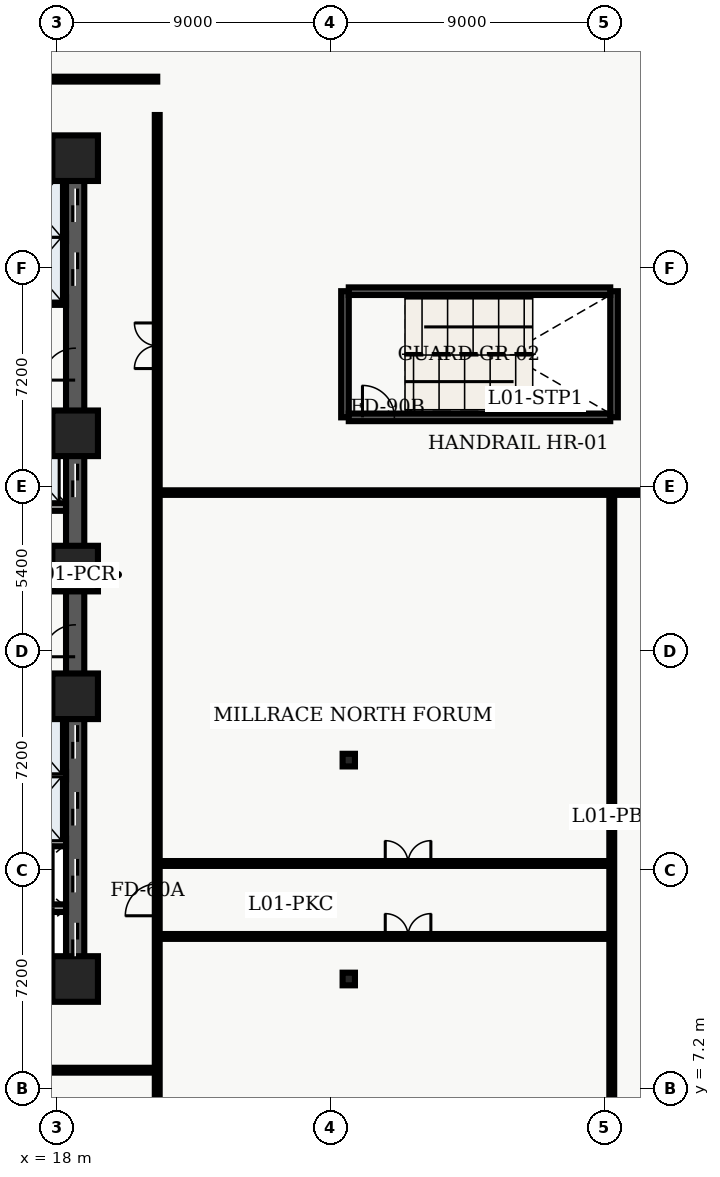
"""IFC4 building model, lengths in metres.
Left out: names, types, materials, properties, quantities, classifications, styles, units other than length and angle.
Written with IfcOpenShell. Run it as: python <this file> out.ifc"""

import sys

from ifc_helpers import new_model, entity, si_unit, converted_unit, direction, frame, origin_with_axes, origin_2d_with_axis, place, context, subcontext, project, spatial, polyline, rectangle, i_section, outline, extrude, element, fill, save


model = new_model("IFC4")
c1 = context("Model", 3, precision=1e-05, world=origin_with_axes(), true_north=direction((0.0, 1.0)))
c2 = subcontext(c1, "Body", "Model", "MODEL_VIEW")
j1 = project(units=[si_unit("LENGTHUNIT", "METRE"), converted_unit("PLANEANGLEUNIT", "DEGREE", entity("IfcPlaneAngleMeasure", 0.017), si_unit("PLANEANGLEUNIT", "RADIAN"), dimensions=[0, 0, 0, 0, 0, 0, 0])], contexts=[c1])
p1 = place(None, origin_with_axes())
s1 = spatial("IfcSite", under=j1, at=p1, CompositionType="ELEMENT")
p2 = place(p1, origin_with_axes())
s2 = spatial("IfcBuilding", under=s1, at=p2, CompositionType="ELEMENT")
p3 = place(p2, frame((0.0, 0.0, 5.7), z_axis=(0.0, 0.0, 1.0), x_axis=(1.0, 0.0, 0.0)))
s3 = spatial("IfcBuildingStorey", under=s2, at=p3, CompositionType="ELEMENT", Elevation=5.7)
p4 = place(p3, frame((11.4, 10.8, 0.0), z_axis=(0.0, 0.0, 1.0), x_axis=(1.0, 0.0, 0.0)))
e1 = element("IfcWall", 1, at=p4, inside=s3, PredefinedType="SHEAR", context=c2, shape_type="SweptSolid", body=[
    extrude(outline(polyline([(0.0, -0.3), (7.2, -0.3), (7.2, 0.3), (0.0, 0.3), (0.0, -0.3)])), origin_with_axes(), (0.0, 0.0, 1.0), 4.86),
])
p5 = place(p4, frame((2.625, 0.0, 0.0), z_axis=(0.0, 0.0, 1.0), x_axis=(1.0, 0.0, 0.0)))
e2 = element("IfcOpeningElement", 2, at=p5, cuts=e1, PredefinedType="OPENING", context=c2, shape_type="SweptSolid", body=[
    extrude(rectangle(XDim=1.05, YDim=0.62, at=origin_2d_with_axis()), origin_with_axes(), (0.0, 0.0, 1.0), 2.15),
])
p6 = place(p3, frame((11.4, 37.8, 0.0), z_axis=(0.0, 0.0, 1.0), x_axis=(1.0, 0.0, 0.0)))
e3 = element("IfcWall", 3, at=p6, inside=s3, PredefinedType="SHEAR", context=c2, shape_type="SweptSolid", body=[
    extrude(outline(polyline([(0.0, -0.3), (7.2, -0.3), (7.2, 0.3), (0.0, 0.3), (0.0, -0.3)])), origin_with_axes(), (0.0, 0.0, 1.0), 4.86),
])
p7 = place(p6, frame((2.625, 0.0, 0.0), z_axis=(0.0, 0.0, 1.0), x_axis=(1.0, 0.0, 0.0)))
e4 = element("IfcOpeningElement", 4, at=p7, cuts=e3, PredefinedType="OPENING", context=c2, shape_type="SweptSolid", body=[
    extrude(rectangle(XDim=1.05, YDim=0.62, at=origin_2d_with_axis()), origin_with_axes(), (0.0, 0.0, 1.0), 2.15),
])
p8 = place(p3, frame((18.6, 10.8, 0.0), z_axis=(0.0, 0.0, 1.0), x_axis=(0.0, 1.0, 0.0)))
e5 = element("IfcWall", 5, at=p8, inside=s3, PredefinedType="SHEAR", context=c2, shape_type="SweptSolid", body=[
    extrude(outline(polyline([(0.0, -0.3), (13.5, -0.3), (13.5, 0.3), (0.0, 0.3), (0.0, -0.3)])), origin_with_axes(), (0.0, 0.0, 1.0), 4.86),
])
p9 = place(p8, frame((1.3, 0.0, 0.0), z_axis=(0.0, 0.0, 1.0), x_axis=(1.0, 0.0, 0.0)))
e6 = element("IfcOpeningElement", 6, at=p9, cuts=e5, PredefinedType="OPENING", context=c2, shape_type="SweptSolid", body=[
    extrude(rectangle(XDim=1.1, YDim=0.62, at=origin_2d_with_axis()), origin_with_axes(), (0.0, 0.0, 1.0), 2.15),
])
p10 = place(p8, frame((3.4, 0.0, 0.0), z_axis=(0.0, 0.0, 1.0), x_axis=(1.0, 0.0, 0.0)))
e7 = element("IfcOpeningElement", 7, at=p10, cuts=e5, PredefinedType="OPENING", context=c2, shape_type="SweptSolid", body=[
    extrude(rectangle(XDim=1.1, YDim=0.62, at=origin_2d_with_axis()), origin_with_axes(), (0.0, 0.0, 1.0), 2.15),
])
p11 = place(p8, frame((5.6, 0.0, 0.0), z_axis=(0.0, 0.0, 1.0), x_axis=(1.0, 0.0, 0.0)))
e8 = element("IfcOpeningElement", 8, at=p11, cuts=e5, PredefinedType="OPENING", context=c2, shape_type="SweptSolid", body=[
    extrude(rectangle(XDim=1.1, YDim=0.62, at=origin_2d_with_axis()), origin_with_axes(), (0.0, 0.0, 1.0), 2.15),
])
p12 = place(p8, frame((7.8, 0.0, 0.0), z_axis=(0.0, 0.0, 1.0), x_axis=(1.0, 0.0, 0.0)))
e9 = element("IfcOpeningElement", 9, at=p12, cuts=e5, PredefinedType="OPENING", context=c2, shape_type="SweptSolid", body=[
    extrude(rectangle(XDim=1.1, YDim=0.62, at=origin_2d_with_axis()), origin_with_axes(), (0.0, 0.0, 1.0), 2.15),
])
p13 = place(p8, frame((11.125, 0.0, 0.0), z_axis=(0.0, 0.0, 1.0), x_axis=(1.0, 0.0, 0.0)))
e10 = element("IfcOpeningElement", 10, at=p13, cuts=e5, PredefinedType="OPENING", context=c2, shape_type="SweptSolid", body=[
    extrude(rectangle(XDim=1.05, YDim=0.62, at=origin_2d_with_axis()), origin_with_axes(), (0.0, 0.0, 1.0), 2.15),
])
p14 = place(p3, frame((18.6, 24.3, 0.0), z_axis=(0.0, 0.0, 1.0), x_axis=(0.0, 1.0, 0.0)))
e11 = element("IfcWall", 11, at=p14, inside=s3, PredefinedType="SHEAR", context=c2, shape_type="SweptSolid", body=[
    extrude(outline(polyline([(0.0, -0.3), (13.5, -0.3), (13.5, 0.3), (0.0, 0.3), (0.0, -0.3)])), origin_with_axes(), (0.0, 0.0, 1.0), 4.86),
])
p15 = place(p14, frame((9.85, 0.0, 0.0), z_axis=(0.0, 0.0, 1.0), x_axis=(1.0, 0.0, 0.0)))
e12 = element("IfcOpeningElement", 12, at=p15, cuts=e11, PredefinedType="OPENING", context=c2, shape_type="SweptSolid", body=[
    extrude(rectangle(XDim=1.1, YDim=0.62, at=origin_2d_with_axis()), origin_with_axes(), (0.0, 0.0, 1.0), 2.15),
])
p16 = place(p14, frame((11.95, 0.0, 0.0), z_axis=(0.0, 0.0, 1.0), x_axis=(1.0, 0.0, 0.0)))
e13 = element("IfcOpeningElement", 13, at=p16, cuts=e11, PredefinedType="OPENING", context=c2, shape_type="SweptSolid", body=[
    extrude(rectangle(XDim=1.1, YDim=0.62, at=origin_2d_with_axis()), origin_with_axes(), (0.0, 0.0, 1.0), 2.15),
])
p17 = place(p14, frame((2.9, 0.0, 0.0), z_axis=(0.0, 0.0, 1.0), x_axis=(1.0, 0.0, 0.0)))
e14 = element("IfcOpeningElement", 14, at=p17, cuts=e11, PredefinedType="OPENING", context=c2, shape_type="SweptSolid", body=[
    extrude(rectangle(XDim=1.1, YDim=0.62, at=origin_2d_with_axis()), origin_with_axes(), (0.0, 0.0, 1.0), 2.15),
])
p18 = place(p14, frame((6.725, 0.0, 0.0), z_axis=(0.0, 0.0, 1.0), x_axis=(1.0, 0.0, 0.0)))
e15 = element("IfcOpeningElement", 15, at=p18, cuts=e11, PredefinedType="OPENING", context=c2, shape_type="SweptSolid", body=[
    extrude(rectangle(XDim=1.05, YDim=0.62, at=origin_2d_with_axis()), origin_with_axes(), (0.0, 0.0, 1.0), 2.15),
])
for number, where, z_axis, x_axis in (
    (16, (11.7, 19.825, 0.0), (0.0, 0.0, 1.0), (1.0, 0.0, 0.0)),
    (17, (11.7, 28.775, 0.0), (0.0, 0.0, 1.0), (1.0, 0.0, 0.0)),
):
    element("IfcWall", number, at=place(p3, frame(where, z_axis=z_axis, x_axis=x_axis)), inside=s3, PredefinedType="SHEAR", context=c2, shape_type="SweptSolid", body=[
        extrude(outline(polyline([(0.0, -0.125), (6.6, -0.125), (6.6, 0.125), (0.0, 0.125), (0.0, -0.125)])), origin_with_axes(), (0.0, 0.0, 1.0), 4.86),
    ])
p19 = place(p3, frame((11.7, 24.1, 0.0), z_axis=(0.0, 0.0, 1.0), x_axis=(1.0, 0.0, 0.0)))
e18 = element("IfcWall", 18, at=p19, inside=s3, PredefinedType="SOLIDWALL", context=c2, shape_type="SweptSolid", body=[
    extrude(outline(polyline([(0.0, -0.125), (6.6, -0.125), (6.6, 0.125), (0.0, 0.125), (0.0, -0.125)])), origin_with_axes(), (0.0, 0.0, 1.0), 3.6),
])
p20 = place(p19, frame((3.75, 0.0, 0.0), z_axis=(0.0, 0.0, 1.0), x_axis=(1.0, 0.0, 0.0)))
e19 = element("IfcOpeningElement", 19, at=p20, cuts=e18, PredefinedType="OPENING", context=c2, shape_type="SweptSolid", body=[
    extrude(rectangle(XDim=0.9, YDim=0.27, at=origin_2d_with_axis()), origin_with_axes(), (0.0, 0.0, 1.0), 2.15),
])
p21 = place(p3, frame((11.7, 26.325, 0.0), z_axis=(0.0, 0.0, 1.0), x_axis=(1.0, 0.0, 0.0)))
e20 = element("IfcWall", 20, at=p21, inside=s3, PredefinedType="SOLIDWALL", context=c2, shape_type="SweptSolid", body=[
    extrude(outline(polyline([(0.0, -0.125), (6.6, -0.125), (6.6, 0.125), (0.0, 0.125), (0.0, -0.125)])), origin_with_axes(), (0.0, 0.0, 1.0), 3.6),
])
p22 = place(p21, frame((3.5, 0.0, 0.0), z_axis=(0.0, 0.0, 1.0), x_axis=(1.0, 0.0, 0.0)))
e21 = element("IfcOpeningElement", 21, at=p22, cuts=e20, PredefinedType="OPENING", context=c2, shape_type="SweptSolid", body=[
    extrude(rectangle(XDim=0.9, YDim=0.27, at=origin_2d_with_axis()), origin_with_axes(), (0.0, 0.0, 1.0), 2.15),
])
for number, where, z_axis, x_axis in (
    (22, (27.475, 29.275, 0.0), (0.0, 0.0, 1.0), (0.0, 1.0, 0.0)),
    (23, (36.325, 29.275, 0.0), (0.0, 0.0, 1.0), (0.0, 1.0, 0.0)),
):
    element("IfcWall", number, at=place(p3, frame(where, z_axis=z_axis, x_axis=x_axis)), inside=s3, PredefinedType="SHEAR", context=c2, shape_type="SweptSolid", body=[
        extrude(outline(polyline([(0.0, -0.125), (4.15, -0.125), (4.15, 0.125), (0.0, 0.125), (0.0, -0.125)])), origin_with_axes(), (0.0, 0.0, 1.0), 4.86),
    ])
p23 = place(p3, frame((27.6, 29.275, 0.0), z_axis=(0.0, 0.0, 1.0), x_axis=(1.0, 0.0, 0.0)))
e24 = element("IfcWall", 24, at=p23, inside=s3, PredefinedType="SHEAR", context=c2, shape_type="SweptSolid", body=[
    extrude(outline(polyline([(0.0, -0.125), (8.6, -0.125), (8.6, 0.125), (0.0, 0.125), (0.0, -0.125)])), origin_with_axes(), (0.0, 0.0, 1.0), 4.86),
])
p24 = place(p23, frame((0.975, 0.0, 0.0), z_axis=(0.0, 0.0, 1.0), x_axis=(1.0, 0.0, 0.0)))
e25 = element("IfcOpeningElement", 25, at=p24, cuts=e24, PredefinedType="OPENING", context=c2, shape_type="SweptSolid", body=[
    extrude(rectangle(XDim=1.05, YDim=0.27, at=origin_2d_with_axis()), origin_with_axes(), (0.0, 0.0, 1.0), 2.15),
])
p25 = place(p3, frame((27.6, 33.425, 0.0), z_axis=(0.0, 0.0, 1.0), x_axis=(1.0, 0.0, 0.0)))
e26 = element("IfcWall", 26, at=p25, inside=s3, PredefinedType="SHEAR", context=c2, shape_type="SweptSolid", body=[
    extrude(outline(polyline([(0.0, -0.125), (8.6, -0.125), (8.6, 0.125), (0.0, 0.125), (0.0, -0.125)])), origin_with_axes(), (0.0, 0.0, 1.0), 4.86),
])
for number, where, z_axis, x_axis in (
    (27, (18.6, 10.8, 0.0), (0.0, 0.0, 1.0), (1.0, 0.0, 0.0)),
    (28, (18.6, 20.1, 0.0), (0.0, 0.0, 1.0), (1.0, 0.0, 0.0)),
    (29, (18.6, 24.3, 0.0), (0.0, 0.0, 1.0), (1.0, 0.0, 0.0)),
    (30, (18.6, 28.75, 0.0), (0.0, 0.0, 1.0), (1.0, 0.0, 0.0)),
    (31, (18.6, 37.8, 0.0), (0.0, 0.0, 1.0), (1.0, 0.0, 0.0)),
):
    element("IfcColumn", number, at=place(p3, frame(where, z_axis=z_axis, x_axis=x_axis)), inside=s3, PredefinedType="COLUMN", context=c2, shape_type="SweptSolid", body=[
        extrude(rectangle(XDim=1.5, YDim=1.5, at=origin_2d_with_axis()), origin_with_axes(), (0.0, 0.0, 1.0), 5.1),
    ])
for number, where, z_axis, x_axis in (
    (32, (27.6, 10.8, 0.0), (0.0, 0.0, 1.0), (1.0, 0.0, 0.0)),
    (33, (27.6, 18.0, 0.0), (0.0, 0.0, 1.0), (1.0, 0.0, 0.0)),
):
    element("IfcColumn", number, at=place(p3, frame(where, z_axis=z_axis, x_axis=x_axis)), inside=s3, PredefinedType="COLUMN", context=c2, shape_type="SweptSolid", body=[
        extrude(i_section(OverallWidth=0.406, OverallDepth=0.416, WebThickness=0.03, FlangeThickness=0.048, FilletRadius=0.022, at=origin_2d_with_axis()), origin_with_axes(), (0.0, 0.0, 1.0), 5.1),
    ])
for number, where, z_axis, x_axis in (
    (34, (15.84, 13.13, 0.0), (0.0, 0.0, 1.0), (1.0, 0.0, 0.0)),
    (35, (15.84, 15.29, 0.0), (0.0, 0.0, 1.0), (1.0, 0.0, 0.0)),
    (36, (15.84, 17.49, 0.0), (0.0, 0.0, 1.0), (1.0, 0.0, 0.0)),
    (37, (15.84, 33.1, 0.0), (0.0, 0.0, 1.0), (1.0, 0.0, 0.0)),
    (38, (15.84, 35.2, 0.0), (0.0, 0.0, 1.0), (1.0, 0.0, 0.0)),
):
    element("IfcWall", number, at=place(p3, frame(where, z_axis=z_axis, x_axis=x_axis)), inside=s3, PredefinedType="SOLIDWALL", context=c2, shape_type="SweptSolid", body=[
        extrude(outline(polyline([(0.0, -0.125), (2.46, -0.125), (2.46, 0.125), (0.0, 0.125), (0.0, -0.125)])), origin_with_axes(), (0.0, 0.0, 1.0), 3.2),
    ])
p26 = place(p3, frame((0.38, 7.8, 0.0), z_axis=(0.0, 0.0, 1.0), x_axis=(1.0, 0.0, 0.0)))
e39 = element("IfcWall", 39, at=p26, inside=s3, PredefinedType="PARTITIONING", context=c2, shape_type="SweptSolid", body=[
    extrude(outline(polyline([(0.0, -0.08), (20.92, -0.08), (20.92, 0.08), (0.0, 0.08), (0.0, -0.08)])), origin_with_axes(), (0.0, 0.0, 1.0), 3.2),
])
p27 = place(p26, frame((3.7, 0.0, 0.0), z_axis=(0.0, 0.0, 1.0), x_axis=(1.0, 0.0, 0.0)))
e40 = element("IfcOpeningElement", 40, at=p27, cuts=e39, PredefinedType="OPENING", context=c2, shape_type="SweptSolid", body=[
    extrude(rectangle(XDim=1.0, YDim=0.18, at=origin_2d_with_axis()), origin_with_axes(), (0.0, 0.0, 1.0), 2.15),
])
p28 = place(p26, frame((15.3, 0.0, 0.0), z_axis=(0.0, 0.0, 1.0), x_axis=(1.0, 0.0, 0.0)))
e41 = element("IfcOpeningElement", 41, at=p28, cuts=e39, PredefinedType="OPENING", context=c2, shape_type="SweptSolid", body=[
    extrude(rectangle(XDim=1.0, YDim=0.18, at=origin_2d_with_axis()), origin_with_axes(), (0.0, 0.0, 1.0), 2.15),
])
p29 = place(p3, frame((0.38, 40.4, 0.0), z_axis=(0.0, 0.0, 1.0), x_axis=(1.0, 0.0, 0.0)))
e42 = element("IfcWall", 42, at=p29, inside=s3, PredefinedType="PARTITIONING", context=c2, shape_type="SweptSolid", body=[
    extrude(outline(polyline([(0.0, -0.08), (20.92, -0.08), (20.92, 0.08), (0.0, 0.08), (0.0, -0.08)])), origin_with_axes(), (0.0, 0.0, 1.0), 3.2),
])
p30 = place(p29, frame((15.25, 0.0, 0.0), z_axis=(0.0, 0.0, 1.0), x_axis=(1.0, 0.0, 0.0)))
e43 = element("IfcOpeningElement", 43, at=p30, cuts=e42, PredefinedType="OPENING", context=c2, shape_type="SweptSolid", body=[
    extrude(rectangle(XDim=1.5, YDim=0.18, at=origin_2d_with_axis()), origin_with_axes(), (0.0, 0.0, 1.0), 2.2),
])
p31 = place(p3, frame((21.3, 0.38, 0.0), z_axis=(0.0, 0.0, 1.0), x_axis=(0.0, 1.0, 0.0)))
e44 = element("IfcWall", 44, at=p31, inside=s3, PredefinedType="PARTITIONING", context=c2, shape_type="SweptSolid", body=[
    extrude(outline(polyline([(0.0, -0.08), (38.84, -0.08), (38.84, 0.08), (0.0, 0.08), (0.0, -0.08)])), origin_with_axes(), (0.0, 0.0, 1.0), 3.2),
])
p32 = place(p31, frame((13.025, 0.0, 0.0), z_axis=(0.0, 0.0, 1.0), x_axis=(1.0, 0.0, 0.0)))
e45 = element("IfcOpeningElement", 45, at=p32, cuts=e44, PredefinedType="OPENING", context=c2, shape_type="SweptSolid", body=[
    extrude(rectangle(XDim=1.05, YDim=0.18, at=origin_2d_with_axis()), origin_with_axes(), (0.0, 0.0, 1.0), 2.15),
])
p33 = place(p31, frame((31.25, 0.0, 0.0), z_axis=(0.0, 0.0, 1.0), x_axis=(1.0, 0.0, 0.0)))
e46 = element("IfcOpeningElement", 46, at=p33, cuts=e44, PredefinedType="OPENING", context=c2, shape_type="SweptSolid", body=[
    extrude(rectangle(XDim=1.5, YDim=0.18, at=origin_2d_with_axis()), origin_with_axes(), (0.0, 0.0, 1.0), 2.2),
])
p34 = place(p3, frame((21.3, 12.2, 0.0), z_axis=(0.0, 0.0, 1.0), x_axis=(1.0, 0.0, 0.0)))
e47 = element("IfcWall", 47, at=p34, inside=s3, PredefinedType="PARTITIONING", context=c2, shape_type="SweptSolid", body=[
    extrude(outline(polyline([(0.0, -0.08), (14.95, -0.08), (14.95, 0.08), (0.0, 0.08), (0.0, -0.08)])), origin_with_axes(), (0.0, 0.0, 1.0), 3.2),
])
p35 = place(p34, frame((8.25, 0.0, 0.0), z_axis=(0.0, 0.0, 1.0), x_axis=(1.0, 0.0, 0.0)))
e48 = element("IfcOpeningElement", 48, at=p35, cuts=e47, PredefinedType="OPENING", context=c2, shape_type="SweptSolid", body=[
    extrude(rectangle(XDim=1.5, YDim=0.18, at=origin_2d_with_axis()), origin_with_axes(), (0.0, 0.0, 1.0), 2.2),
])
p36 = place(p3, frame((21.3, 14.6, 0.0), z_axis=(0.0, 0.0, 1.0), x_axis=(1.0, 0.0, 0.0)))
e49 = element("IfcWall", 49, at=p36, inside=s3, PredefinedType="PARTITIONING", context=c2, shape_type="SweptSolid", body=[
    extrude(outline(polyline([(0.0, -0.08), (14.95, -0.08), (14.95, 0.08), (0.0, 0.08), (0.0, -0.08)])), origin_with_axes(), (0.0, 0.0, 1.0), 3.2),
])
p37 = place(p36, frame((8.25, 0.0, 0.0), z_axis=(0.0, 0.0, 1.0), x_axis=(1.0, 0.0, 0.0)))
e50 = element("IfcOpeningElement", 50, at=p37, cuts=e49, PredefinedType="OPENING", context=c2, shape_type="SweptSolid", body=[
    extrude(rectangle(XDim=1.5, YDim=0.18, at=origin_2d_with_axis()), origin_with_axes(), (0.0, 0.0, 1.0), 2.2),
])
p38 = place(p3, frame((36.25, 4.3, 0.0), z_axis=(0.0, 0.0, 1.0), x_axis=(0.0, 1.0, 0.0)))
e51 = element("IfcWall", 51, at=p38, inside=s3, PredefinedType="PARTITIONING", context=c2, shape_type="SweptSolid", body=[
    extrude(outline(polyline([(0.0, -0.08), (22.5, -0.08), (22.5, 0.08), (0.0, 0.08), (0.0, -0.08)])), origin_with_axes(), (0.0, 0.0, 1.0), 3.2),
])
p39 = place(p3, frame((21.3, 26.8, 0.0), z_axis=(0.0, 0.0, 1.0), x_axis=(1.0, 0.0, 0.0)))
e52 = element("IfcWall", 52, at=p39, inside=s3, PredefinedType="PARTITIONING", context=c2, shape_type="SweptSolid", body=[
    extrude(outline(polyline([(0.0, -0.075), (29.25, -0.075), (29.25, 0.075), (0.0, 0.075), (0.0, -0.075)])), origin_with_axes(), (0.0, 0.0, 1.0), 3.2),
])
p40 = place(p8, frame((1.3, 0.0, 0.0), z_axis=(0.0, 0.0, 1.0), x_axis=(1.0, 0.0, 0.0)))
e53 = element("IfcDoor", 53, at=p40, inside=s3, OperationType="SLIDING_TO_LEFT", PredefinedType="DOOR", context=c2, shape_type="SweptSolid", body=[
    extrude(rectangle(XDim=1.1, YDim=0.09, at=origin_2d_with_axis()), origin_with_axes(), (0.0, 0.0, 1.0), 2.15),
])
fill(e6, e53)
p41 = place(p8, frame((3.4, 0.0, 0.0), z_axis=(0.0, 0.0, 1.0), x_axis=(1.0, 0.0, 0.0)))
e54 = element("IfcDoor", 54, at=p41, inside=s3, OperationType="SLIDING_TO_RIGHT", PredefinedType="DOOR", context=c2, shape_type="SweptSolid", body=[
    extrude(rectangle(XDim=1.1, YDim=0.09, at=origin_2d_with_axis()), origin_with_axes(), (0.0, 0.0, 1.0), 2.15),
])
fill(e7, e54)
p42 = place(p8, frame((5.6, 0.0, 0.0), z_axis=(0.0, 0.0, 1.0), x_axis=(1.0, 0.0, 0.0)))
e55 = element("IfcDoor", 55, at=p42, inside=s3, OperationType="DOUBLE_DOOR_SLIDING", PredefinedType="DOOR", context=c2, shape_type="SweptSolid", body=[
    extrude(rectangle(XDim=1.1, YDim=0.09, at=origin_2d_with_axis()), origin_with_axes(), (0.0, 0.0, 1.0), 2.15),
])
fill(e8, e55)
p43 = place(p8, frame((7.8, 0.0, 0.0), z_axis=(0.0, 0.0, 1.0), x_axis=(1.0, 0.0, 0.0)))
e56 = element("IfcDoor", 56, at=p43, inside=s3, OperationType="DOUBLE_DOOR_SLIDING", PredefinedType="DOOR", context=c2, shape_type="SweptSolid", body=[
    extrude(rectangle(XDim=1.1, YDim=0.09, at=origin_2d_with_axis()), origin_with_axes(), (0.0, 0.0, 1.0), 2.15),
])
fill(e9, e56)
p44 = place(p14, frame((9.85, 0.0, 0.0), z_axis=(0.0, 0.0, 1.0), x_axis=(1.0, 0.0, 0.0)))
e57 = element("IfcDoor", 57, at=p44, inside=s3, OperationType="DOUBLE_DOOR_SLIDING", PredefinedType="DOOR", context=c2, shape_type="SweptSolid", body=[
    extrude(rectangle(XDim=1.1, YDim=0.09, at=origin_2d_with_axis()), origin_with_axes(), (0.0, 0.0, 1.0), 2.15),
])
fill(e12, e57)
p45 = place(p14, frame((11.95, 0.0, 0.0), z_axis=(0.0, 0.0, 1.0), x_axis=(1.0, 0.0, 0.0)))
e58 = element("IfcDoor", 58, at=p45, inside=s3, OperationType="DOUBLE_DOOR_SLIDING", PredefinedType="DOOR", context=c2, shape_type="SweptSolid", body=[
    extrude(rectangle(XDim=1.1, YDim=0.09, at=origin_2d_with_axis()), origin_with_axes(), (0.0, 0.0, 1.0), 2.15),
])
fill(e13, e58)
p46 = place(p14, frame((2.9, 0.0, 0.0), z_axis=(0.0, 0.0, 1.0), x_axis=(1.0, 0.0, 0.0)))
e59 = element("IfcDoor", 59, at=p46, inside=s3, OperationType="DOUBLE_DOOR_SLIDING", PredefinedType="DOOR", context=c2, shape_type="SweptSolid", body=[
    extrude(rectangle(XDim=1.1, YDim=0.09, at=origin_2d_with_axis()), origin_with_axes(), (0.0, 0.0, 1.0), 2.15),
])
fill(e14, e59)
p47 = place(p8, frame((11.125, 0.0, 0.0), z_axis=(0.0, 0.0, 1.0), x_axis=(1.0, 0.0, 0.0)))
e60 = element("IfcDoor", 60, at=p47, inside=s3, OperationType="SINGLE_SWING_LEFT", PredefinedType="DOOR", context=c2, shape_type="SweptSolid", body=[
    extrude(rectangle(XDim=1.05, YDim=0.09, at=origin_2d_with_axis()), origin_with_axes(), (0.0, 0.0, 1.0), 2.15),
])
fill(e10, e60)
p48 = place(p14, frame((6.725, 0.0, 0.0), z_axis=(0.0, 0.0, 1.0), x_axis=(1.0, 0.0, 0.0)))
e61 = element("IfcDoor", 61, at=p48, inside=s3, OperationType="SINGLE_SWING_LEFT", PredefinedType="DOOR", context=c2, shape_type="SweptSolid", body=[
    extrude(rectangle(XDim=1.05, YDim=0.09, at=origin_2d_with_axis()), origin_with_axes(), (0.0, 0.0, 1.0), 2.15),
])
fill(e15, e61)
p49 = place(p23, frame((0.975, 0.0, 0.0), z_axis=(0.0, 0.0, 1.0), x_axis=(1.0, 0.0, 0.0)))
e62 = element("IfcDoor", 62, at=p49, inside=s3, OperationType="SINGLE_SWING_LEFT", PredefinedType="DOOR", context=c2, shape_type="SweptSolid", body=[
    extrude(rectangle(XDim=1.05, YDim=0.09, at=origin_2d_with_axis()), origin_with_axes(), (0.0, 0.0, 1.0), 2.15),
])
fill(e25, e62)
p50 = place(p31, frame((13.025, 0.0, 0.0), z_axis=(0.0, 0.0, 1.0), x_axis=(1.0, 0.0, 0.0)))
e63 = element("IfcDoor", 63, at=p50, inside=s3, OperationType="SINGLE_SWING_LEFT", PredefinedType="DOOR", context=c2, shape_type="SweptSolid", body=[
    extrude(rectangle(XDim=1.05, YDim=0.09, at=origin_2d_with_axis()), origin_with_axes(), (0.0, 0.0, 1.0), 2.15),
])
fill(e45, e63)
p51 = place(p34, frame((8.25, 0.0, 0.0), z_axis=(0.0, 0.0, 1.0), x_axis=(1.0, 0.0, 0.0)))
e64 = element("IfcDoor", 64, at=p51, inside=s3, OperationType="DOUBLE_DOOR_SINGLE_SWING", PredefinedType="DOOR", context=c2, shape_type="SweptSolid", body=[
    extrude(rectangle(XDim=1.5, YDim=0.09, at=origin_2d_with_axis()), origin_with_axes(), (0.0, 0.0, 1.0), 2.2),
])
fill(e48, e64)
p52 = place(p36, frame((8.25, 0.0, 0.0), z_axis=(0.0, 0.0, 1.0), x_axis=(1.0, 0.0, 0.0)))
e65 = element("IfcDoor", 65, at=p52, inside=s3, OperationType="DOUBLE_DOOR_SINGLE_SWING", PredefinedType="DOOR", context=c2, shape_type="SweptSolid", body=[
    extrude(rectangle(XDim=1.5, YDim=0.09, at=origin_2d_with_axis()), origin_with_axes(), (0.0, 0.0, 1.0), 2.2),
])
fill(e50, e65)
p53 = place(p31, frame((31.25, 0.0, 0.0), z_axis=(0.0, 0.0, 1.0), x_axis=(1.0, 0.0, 0.0)))
e66 = element("IfcDoor", 66, at=p53, inside=s3, OperationType="DOUBLE_DOOR_SINGLE_SWING", PredefinedType="DOOR", context=c2, shape_type="SweptSolid", body=[
    extrude(rectangle(XDim=1.5, YDim=0.09, at=origin_2d_with_axis()), origin_with_axes(), (0.0, 0.0, 1.0), 2.2),
])
fill(e46, e66)
save(model, sys.argv[1])
